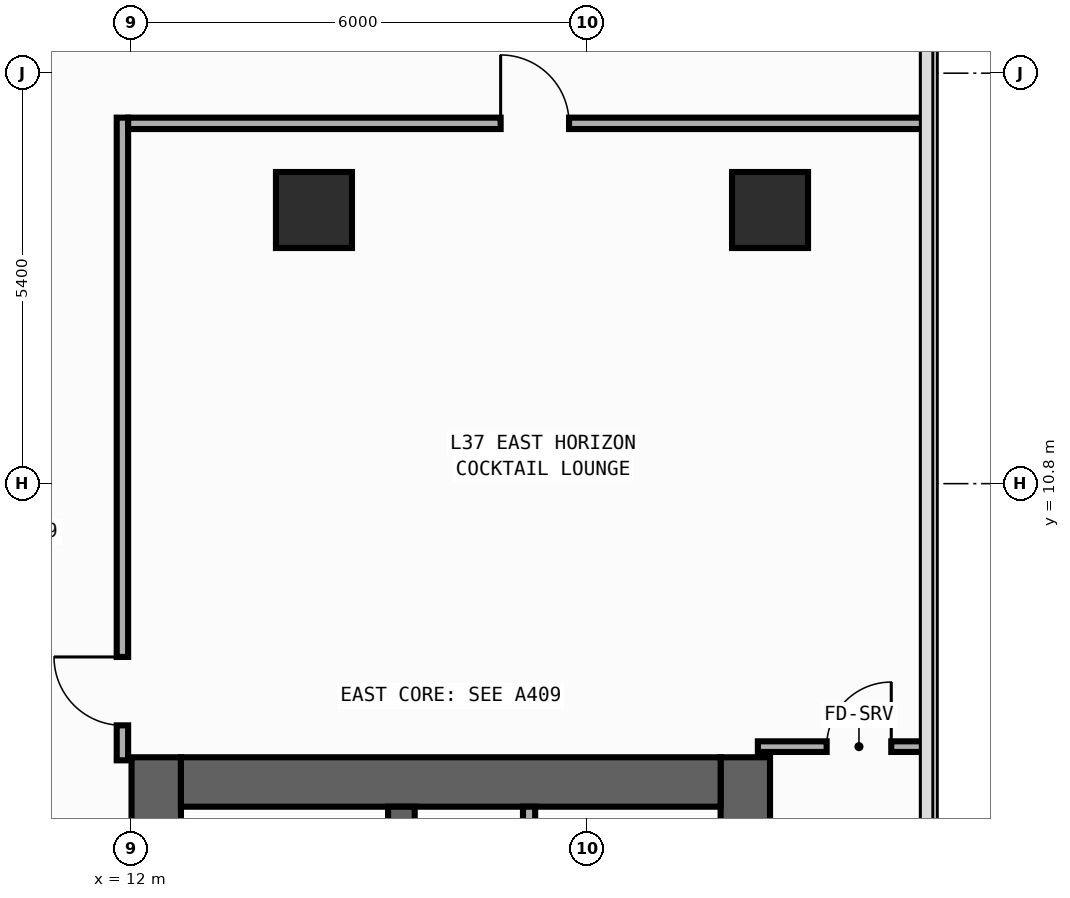
"""IFC4 building model, lengths in metres.
Left out: names, types, materials, properties, quantities, classifications, styles, units other than length and angle.
Written with IfcOpenShell. Run it as: python <this file> out.ifc"""

import sys

from ifc_helpers import new_model, si_unit, direction, frame, frame_2d, origin, origin_2d, place, context, subcontext, project, spatial, rectangle, extrude, element, fill, save


model = new_model("IFC4")
c1 = context("Model", 3, precision=1e-05, world=origin(), true_north=direction((0.0, 1.0)))
c2 = subcontext(c1, "Body", "Model", "MODEL_VIEW")
j1 = project(units=[si_unit("LENGTHUNIT", "METRE"), si_unit("PLANEANGLEUNIT", "RADIAN")], contexts=[c1])
p1 = place(None, origin())
s1 = spatial("IfcSite", under=j1, at=p1, CompositionType="ELEMENT")
p2 = place(p1, origin())
s2 = spatial("IfcBuilding", under=s1, at=p2, CompositionType="ELEMENT")
p3 = place(p2, frame((0.0, 0.0, 165.0)))
s3 = spatial("IfcBuildingStorey", under=s2, at=p3, CompositionType="ELEMENT", Elevation=165.0)
p4 = place(p3, frame((12.325, -19.8, 0.0), z_axis=(0.0, 0.0, 1.0), x_axis=(0.0, 1.0, 0.0)))
e1 = element("IfcWall", 1, at=p4, inside=s3, PredefinedType="SHEAR", context=c2, shape_type="SweptSolid", body=[
    extrude(rectangle(XDim=27.0, YDim=0.65, at=frame_2d((13.5, 0.0))), origin(), (0.0, 0.0, 1.0), 3.54),
])
p5 = place(p4, frame((23.05, 0.0, 0.0)))
e2 = element("IfcOpeningElement", 2, at=p5, cuts=e1, PredefinedType="OPENING", context=c2, shape_type="SweptSolid", body=[
    extrude(rectangle(XDim=1.1, YDim=2.2, at=frame_2d((0.55, 1.1))), frame((0.0, 0.335, 0.0), z_axis=(0.0, -1.0, 0.0), x_axis=(1.0, 0.0, 0.0)), (0.0, 0.0, 1.0), 0.67),
])
p6 = place(p4, frame((19.85, 0.0, 0.0)))
e3 = element("IfcOpeningElement", 3, at=p6, cuts=e1, PredefinedType="OPENING", context=c2, shape_type="SweptSolid", body=[
    extrude(rectangle(XDim=1.1, YDim=2.2, at=frame_2d((0.55, 1.1))), frame((0.0, 0.335, 0.0), z_axis=(0.0, -1.0, 0.0), x_axis=(1.0, 0.0, 0.0)), (0.0, 0.0, 1.0), 0.67),
])
p7 = place(p4, frame((16.65, 0.0, 0.0)))
e4 = element("IfcOpeningElement", 4, at=p7, cuts=e1, PredefinedType="OPENING", context=c2, shape_type="SweptSolid", body=[
    extrude(rectangle(XDim=1.1, YDim=2.2, at=frame_2d((0.55, 1.1))), frame((0.0, 0.335, 0.0), z_axis=(0.0, -1.0, 0.0), x_axis=(1.0, 0.0, 0.0)), (0.0, 0.0, 1.0), 0.67),
])
p8 = place(p4, frame((10.175, 0.0, 0.0)))
e5 = element("IfcOpeningElement", 5, at=p8, cuts=e1, PredefinedType="OPENING", context=c2, shape_type="SweptSolid", body=[
    extrude(rectangle(XDim=0.85, YDim=2.1, at=frame_2d((0.425, 1.05))), frame((0.0, 0.335, 0.0), z_axis=(0.0, -1.0, 0.0), x_axis=(1.0, 0.0, 0.0)), (0.0, 0.0, 1.0), 0.67),
])
p9 = place(p4, frame((12.725, 0.0, 0.0)))
e6 = element("IfcOpeningElement", 6, at=p9, cuts=e1, PredefinedType="OPENING", context=c2, shape_type="SweptSolid", body=[
    extrude(rectangle(XDim=1.15, YDim=2.2, at=frame_2d((0.575, 1.1))), frame((0.0, 0.335, 0.0), z_axis=(0.0, -1.0, 0.0), x_axis=(1.0, 0.0, 0.0)), (0.0, 0.0, 1.0), 0.67),
])
p10 = place(p4, frame((25.125, 0.0, 0.0)))
e7 = element("IfcOpeningElement", 7, at=p10, cuts=e1, PredefinedType="OPENING", context=c2, shape_type="SweptSolid", body=[
    extrude(rectangle(XDim=0.85, YDim=2.1, at=frame_2d((0.425, 1.05))), frame((0.0, 0.335, 0.0), z_axis=(0.0, -1.0, 0.0), x_axis=(1.0, 0.0, 0.0)), (0.0, 0.0, 1.0), 0.67),
])
p11 = place(p3, frame((20.075, -19.8, 0.0), z_axis=(0.0, 0.0, 1.0), x_axis=(0.0, 1.0, 0.0)))
e8 = element("IfcWall", 8, at=p11, inside=s3, PredefinedType="SHEAR", context=c2, shape_type="SweptSolid", body=[
    extrude(rectangle(XDim=27.0, YDim=0.65, at=frame_2d((13.5, 0.0))), origin(), (0.0, 0.0, 1.0), 3.54),
])
p12 = place(p3, frame((12.65, 6.875, 0.0), z_axis=(0.0, 0.0, 1.0), x_axis=(1.0, 0.0, 0.0)))
e9 = element("IfcWall", 9, at=p12, inside=s3, PredefinedType="SHEAR", context=c2, shape_type="SweptSolid", body=[
    extrude(rectangle(XDim=7.1, YDim=0.65, at=frame_2d((3.55, 0.0))), origin(), (0.0, 0.0, 1.0), 3.54),
])
p13 = place(p3, frame((15.55, -19.15, 0.0), z_axis=(0.0, 0.0, 1.0), x_axis=(0.0, 1.0, 0.0)))
e10 = element("IfcWall", 10, at=p13, inside=s3, PredefinedType="SHEAR", context=c2, shape_type="SweptSolid", body=[
    extrude(rectangle(XDim=25.7, YDim=0.35, at=frame_2d((12.85, 0.0))), origin(), (0.0, 0.0, 1.0), 3.54),
])
p14 = place(p13, frame((12.075, 0.0, 0.0)))
e11 = element("IfcOpeningElement", 11, at=p14, cuts=e10, PredefinedType="OPENING", context=c2, shape_type="SweptSolid", body=[
    extrude(rectangle(XDim=1.15, YDim=2.2, at=frame_2d((0.575, 1.1))), frame((0.0, 0.185, 0.0), z_axis=(0.0, -1.0, 0.0), x_axis=(1.0, 0.0, 0.0)), (0.0, 0.0, 1.0), 0.37),
])
p15 = place(p13, frame((24.475, 0.0, 0.0)))
e12 = element("IfcOpeningElement", 12, at=p15, cuts=e10, PredefinedType="OPENING", context=c2, shape_type="SweptSolid", body=[
    extrude(rectangle(XDim=0.85, YDim=2.1, at=frame_2d((0.425, 1.05))), frame((0.0, 0.185, 0.0), z_axis=(0.0, -1.0, 0.0), x_axis=(1.0, 0.0, 0.0)), (0.0, 0.0, 1.0), 0.37),
])
for number, where, z_axis, x_axis in (
    (13, (20.4, 14.4, 0.0), (0.0, 0.0, 1.0), (1.0, 0.0, 0.0)),
    (14, (14.4, 14.4, 0.0), (0.0, 0.0, 1.0), (1.0, 0.0, 0.0)),
):
    element("IfcColumn", number, at=place(p3, frame(where, z_axis=z_axis, x_axis=x_axis)), inside=s3, PredefinedType="COLUMN", context=c2, shape_type="SweptSolid", body=[
        extrude(rectangle(XDim=1.0, YDim=1.0, at=origin_2d()), origin(), (0.0, 0.0, 1.0), 3.8),
    ])
p16 = place(p3, frame((17.23, 4.17, 0.0), z_axis=(0.0, 0.0, 1.0), x_axis=(0.0, 1.0, 0.0)))
e15 = element("IfcWall", 15, at=p16, inside=s3, PredefinedType="PARTITIONING", context=c2, shape_type="SweptSolid", body=[
    extrude(rectangle(XDim=2.38, YDim=0.16, at=frame_2d((1.19, 0.0))), origin(), (0.0, 0.0, 1.0), 3.54),
])
p17 = place(p16, frame((0.46, 0.0, 0.0)))
e16 = element("IfcOpeningElement", 16, at=p17, cuts=e15, PredefinedType="OPENING", context=c2, shape_type="SweptSolid", body=[
    extrude(rectangle(XDim=0.85, YDim=2.1, at=frame_2d((0.425, 1.05))), frame((0.0, 0.09, 0.0), z_axis=(0.0, -1.0, 0.0), x_axis=(1.0, 0.0, 0.0)), (0.0, 0.0, 1.0), 0.18),
])
p18 = place(p3, frame((11.88, 7.16, 0.0), z_axis=(0.0, 0.0, 1.0), x_axis=(0.0, 1.0, 0.0)))
e17 = element("IfcWall", 17, at=p18, inside=s3, PredefinedType="PARTITIONING", context=c2, shape_type="SweptSolid", body=[
    extrude(rectangle(XDim=8.455, YDim=0.15, at=frame_2d((4.228, 0.0))), origin(), (0.0, 0.0, 1.0), 3.54),
])
p19 = place(p18, frame((0.46, 0.0, 0.0)))
e18 = element("IfcOpeningElement", 18, at=p19, cuts=e17, PredefinedType="OPENING", context=c2, shape_type="SweptSolid", body=[
    extrude(rectangle(XDim=0.9, YDim=2.15, at=frame_2d((0.45, 1.075))), frame((0.0, 0.085, 0.0), z_axis=(0.0, -1.0, 0.0), x_axis=(1.0, 0.0, 0.0)), (0.0, 0.0, 1.0), 0.17),
])
p20 = place(p3, frame((11.955, 15.54, 0.0), z_axis=(0.0, 0.0, 1.0), x_axis=(1.0, 0.0, 0.0)))
e19 = element("IfcWall", 19, at=p20, inside=s3, PredefinedType="PARTITIONING", context=c2, shape_type="SweptSolid", body=[
    extrude(rectangle(XDim=10.5, YDim=0.15, at=frame_2d((5.25, 0.0))), origin(), (0.0, 0.0, 1.0), 3.54),
])
p21 = place(p20, frame((4.901, 0.0, 0.0)))
e20 = element("IfcOpeningElement", 20, at=p21, cuts=e19, PredefinedType="OPENING", context=c2, shape_type="SweptSolid", body=[
    extrude(rectangle(XDim=0.9, YDim=2.15, at=frame_2d((0.45, 1.075))), frame((0.0, 0.085, 0.0), z_axis=(0.0, -1.0, 0.0), x_axis=(1.0, 0.0, 0.0)), (0.0, 0.0, 1.0), 0.17),
])
p22 = place(p3, frame((20.24, 7.34, 0.0), z_axis=(0.0, 0.0, 1.0), x_axis=(1.0, 0.0, 0.0)))
e21 = element("IfcWall", 21, at=p22, inside=s3, PredefinedType="PARTITIONING", context=c2, shape_type="SweptSolid", body=[
    extrude(rectangle(XDim=2.215, YDim=0.14, at=frame_2d((1.107, 0.0))), origin(), (0.0, 0.0, 1.0), 3.54),
])
p23 = place(p22, frame((0.905, 0.0, 0.0)))
e22 = element("IfcOpeningElement", 22, at=p23, cuts=e21, PredefinedType="OPENING", context=c2, shape_type="SweptSolid", body=[
    extrude(rectangle(XDim=0.85, YDim=2.1, at=frame_2d((0.425, 1.05))), frame((0.0, 0.08, 0.0), z_axis=(0.0, -1.0, 0.0), x_axis=(1.0, 0.0, 0.0)), (0.0, 0.0, 1.0), 0.16),
])
p24 = place(p19, origin())
e23 = element("IfcDoor", 23, at=p24, inside=s3, OperationType="SINGLE_SWING_RIGHT", PredefinedType="DOOR", context=c2, shape_type="SweptSolid", body=[
    extrude(rectangle(XDim=0.9, YDim=2.15, at=frame_2d((0.45, 1.075))), frame((0.0, 0.025, 0.0), z_axis=(0.0, -1.0, 0.0), x_axis=(1.0, 0.0, 0.0)), (0.0, 0.0, 1.0), 0.05),
])
fill(e18, e23)
p25 = place(p21, origin())
e24 = element("IfcDoor", 24, at=p25, inside=s3, OperationType="SINGLE_SWING_LEFT", PredefinedType="DOOR", context=c2, shape_type="SweptSolid", body=[
    extrude(rectangle(XDim=0.9, YDim=2.15, at=frame_2d((0.45, 1.075))), frame((0.0, 0.025, 0.0), z_axis=(0.0, -1.0, 0.0), x_axis=(1.0, 0.0, 0.0)), (0.0, 0.0, 1.0), 0.05),
])
fill(e20, e24)
p26 = place(p23, origin())
e25 = element("IfcDoor", 25, at=p26, inside=s3, OperationType="SINGLE_SWING_RIGHT", PredefinedType="DOOR", context=c2, shape_type="SweptSolid", body=[
    extrude(rectangle(XDim=0.85, YDim=2.1, at=frame_2d((0.425, 1.05))), frame((0.0, 0.025, 0.0), z_axis=(0.0, -1.0, 0.0), x_axis=(1.0, 0.0, 0.0)), (0.0, 0.0, 1.0), 0.05),
])
fill(e22, e25)
save(model, sys.argv[1])
